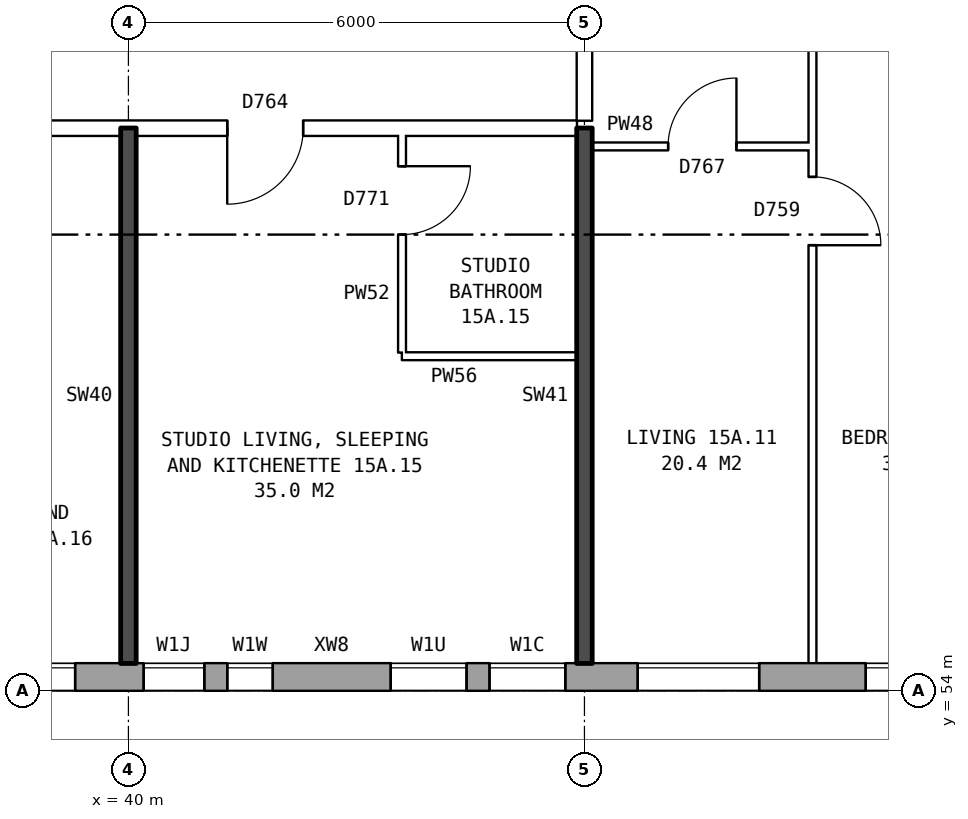
"""IFC4 building model, lengths in metres.
Left out: names, types, materials, properties, quantities, classifications, styles, units other than length and angle.
Written with IfcOpenShell. Run it as: python <this file> out.ifc"""

import sys

from ifc_helpers import new_model, si_unit, direction, frame, frame_2d, origin, place, context, subcontext, project, spatial, rectangle, extrude, element, fill, save


model = new_model("IFC4")
c1 = context("Model", 3, precision=1e-05, world=origin(), true_north=direction((0.0, 1.0)))
c2 = subcontext(c1, "Body", "Model", "MODEL_VIEW")
j1 = project(units=[si_unit("LENGTHUNIT", "METRE"), si_unit("PLANEANGLEUNIT", "RADIAN")], contexts=[c1])
p1 = place(None, origin())
s1 = spatial("IfcSite", under=j1, at=p1, CompositionType="ELEMENT")
p2 = place(p1, origin())
s2 = spatial("IfcBuilding", under=s1, at=p2, CompositionType="ELEMENT")
p3 = place(p2, frame((0.0, 0.0, 56.7)))
s3 = spatial("IfcBuildingStorey", under=s2, at=p3, CompositionType="ELEMENT", Elevation=56.7)
p4 = place(p3, frame((24.575, 54.18, 0.0), z_axis=(0.0, 0.0, 1.0), x_axis=(1.0, 0.0, 0.0)))
e1 = element("IfcWall", 1, at=p4, inside=s3, PredefinedType="STANDARD", context=c2, shape_type="SweptSolid", body=[
    extrude(rectangle(XDim=48.351, YDim=0.36, at=frame_2d((24.175, 0.0))), origin(), (0.0, 0.0, 1.0), 2.85),
])
p5 = place(p4, frame((1.125, 0.0, 0.8)))
e2 = element("IfcOpeningElement", 2, at=p5, cuts=e1, PredefinedType="OPENING", context=c2, shape_type="SweptSolid", body=[
    extrude(rectangle(XDim=1.6, YDim=1.8, at=frame_2d((0.8, 0.9))), frame((0.0, 0.19, 0.0), z_axis=(0.0, -1.0, 0.0), x_axis=(1.0, 0.0, 0.0)), (0.0, 0.0, 1.0), 0.38),
])
p6 = place(p4, frame((4.125, 0.0, 0.8)))
e3 = element("IfcOpeningElement", 3, at=p6, cuts=e1, PredefinedType="OPENING", context=c2, shape_type="SweptSolid", body=[
    extrude(rectangle(XDim=1.6, YDim=1.8, at=frame_2d((0.8, 0.9))), frame((0.0, 0.19, 0.0), z_axis=(0.0, -1.0, 0.0), x_axis=(1.0, 0.0, 0.0)), (0.0, 0.0, 1.0), 0.38),
])
p7 = place(p4, frame((7.125, 0.0, 0.8)))
e4 = element("IfcOpeningElement", 4, at=p7, cuts=e1, PredefinedType="OPENING", context=c2, shape_type="SweptSolid", body=[
    extrude(rectangle(XDim=1.6, YDim=1.8, at=frame_2d((0.8, 0.9))), frame((0.0, 0.19, 0.0), z_axis=(0.0, -1.0, 0.0), x_axis=(1.0, 0.0, 0.0)), (0.0, 0.0, 1.0), 0.38),
])
p8 = place(p4, frame((10.125, 0.0, 0.8)))
e5 = element("IfcOpeningElement", 5, at=p8, cuts=e1, PredefinedType="OPENING", context=c2, shape_type="SweptSolid", body=[
    extrude(rectangle(XDim=1.6, YDim=1.8, at=frame_2d((0.8, 0.9))), frame((0.0, 0.19, 0.0), z_axis=(0.0, -1.0, 0.0), x_axis=(1.0, 0.0, 0.0)), (0.0, 0.0, 1.0), 0.38),
])
p9 = place(p4, frame((13.125, 0.0, 0.8)))
e6 = element("IfcOpeningElement", 6, at=p9, cuts=e1, PredefinedType="OPENING", context=c2, shape_type="SweptSolid", body=[
    extrude(rectangle(XDim=1.6, YDim=1.8, at=frame_2d((0.8, 0.9))), frame((0.0, 0.19, 0.0), z_axis=(0.0, -1.0, 0.0), x_axis=(1.0, 0.0, 0.0)), (0.0, 0.0, 1.0), 0.38),
])
p10 = place(p4, frame((15.625, 0.0, 1.0)))
e7 = element("IfcOpeningElement", 7, at=p10, cuts=e1, PredefinedType="OPENING", context=c2, shape_type="SweptSolid", body=[
    extrude(rectangle(XDim=0.8, YDim=1.5, at=frame_2d((0.4, 0.75))), frame((0.0, 0.19, 0.0), z_axis=(0.0, -1.0, 0.0), x_axis=(1.0, 0.0, 0.0)), (0.0, 0.0, 1.0), 0.38),
])
p11 = place(p4, frame((16.725, 0.0, 1.6)))
e8 = element("IfcOpeningElement", 8, at=p11, cuts=e1, PredefinedType="OPENING", context=c2, shape_type="SweptSolid", body=[
    extrude(rectangle(XDim=0.6, YDim=0.9, at=frame_2d((0.3, 0.45))), frame((0.0, 0.19, 0.0), z_axis=(0.0, -1.0, 0.0), x_axis=(1.0, 0.0, 0.0)), (0.0, 0.0, 1.0), 0.38),
])
p12 = place(p4, frame((22.125, 0.0, 0.8)))
e9 = element("IfcOpeningElement", 9, at=p12, cuts=e1, PredefinedType="OPENING", context=c2, shape_type="SweptSolid", body=[
    extrude(rectangle(XDim=1.6, YDim=1.8, at=frame_2d((0.8, 0.9))), frame((0.0, 0.19, 0.0), z_axis=(0.0, -1.0, 0.0), x_axis=(1.0, 0.0, 0.0)), (0.0, 0.0, 1.0), 0.38),
])
p13 = place(p4, frame((25.125, 0.0, 0.8)))
e10 = element("IfcOpeningElement", 10, at=p13, cuts=e1, PredefinedType="OPENING", context=c2, shape_type="SweptSolid", body=[
    extrude(rectangle(XDim=1.6, YDim=1.8, at=frame_2d((0.8, 0.9))), frame((0.0, 0.19, 0.0), z_axis=(0.0, -1.0, 0.0), x_axis=(1.0, 0.0, 0.0)), (0.0, 0.0, 1.0), 0.38),
])
p14 = place(p4, frame((27.625, 0.0, 0.35)))
e11 = element("IfcOpeningElement", 11, at=p14, cuts=e1, PredefinedType="OPENING", context=c2, shape_type="SweptSolid", body=[
    extrude(rectangle(XDim=1.2, YDim=1.8, at=frame_2d((0.6, 0.9))), frame((0.0, 0.19, 0.0), z_axis=(0.0, -1.0, 0.0), x_axis=(1.0, 0.0, 0.0)), (0.0, 0.0, 1.0), 0.38),
])
p15 = place(p4, frame((30.875, 0.0, 1.7)))
e12 = element("IfcOpeningElement", 12, at=p15, cuts=e1, PredefinedType="OPENING", context=c2, shape_type="SweptSolid", body=[
    extrude(rectangle(XDim=1.0, YDim=0.9, at=frame_2d((0.5, 0.45))), frame((0.0, 0.19, 0.0), z_axis=(0.0, -1.0, 0.0), x_axis=(1.0, 0.0, 0.0)), (0.0, 0.0, 1.0), 0.38),
])
p16 = place(p4, frame((34.125, 0.0, 0.8)))
e13 = element("IfcOpeningElement", 13, at=p16, cuts=e1, PredefinedType="OPENING", context=c2, shape_type="SweptSolid", body=[
    extrude(rectangle(XDim=1.6, YDim=1.8, at=frame_2d((0.8, 0.9))), frame((0.0, 0.19, 0.0), z_axis=(0.0, -1.0, 0.0), x_axis=(1.0, 0.0, 0.0)), (0.0, 0.0, 1.0), 0.38),
])
p17 = place(p4, frame((37.125, 0.0, 0.8)))
e14 = element("IfcOpeningElement", 14, at=p17, cuts=e1, PredefinedType="OPENING", context=c2, shape_type="SweptSolid", body=[
    extrude(rectangle(XDim=1.6, YDim=1.8, at=frame_2d((0.8, 0.9))), frame((0.0, 0.19, 0.0), z_axis=(0.0, -1.0, 0.0), x_axis=(1.0, 0.0, 0.0)), (0.0, 0.0, 1.0), 0.38),
])
p18 = place(p4, frame((40.125, 0.0, 0.8)))
e15 = element("IfcOpeningElement", 15, at=p18, cuts=e1, PredefinedType="OPENING", context=c2, shape_type="SweptSolid", body=[
    extrude(rectangle(XDim=1.6, YDim=1.8, at=frame_2d((0.8, 0.9))), frame((0.0, 0.19, 0.0), z_axis=(0.0, -1.0, 0.0), x_axis=(1.0, 0.0, 0.0)), (0.0, 0.0, 1.0), 0.38),
])
p19 = place(p4, frame((43.125, 0.0, 0.8)))
e16 = element("IfcOpeningElement", 16, at=p19, cuts=e1, PredefinedType="OPENING", context=c2, shape_type="SweptSolid", body=[
    extrude(rectangle(XDim=1.6, YDim=1.8, at=frame_2d((0.8, 0.9))), frame((0.0, 0.19, 0.0), z_axis=(0.0, -1.0, 0.0), x_axis=(1.0, 0.0, 0.0)), (0.0, 0.0, 1.0), 0.38),
])
p20 = place(p4, frame((46.125, 0.0, 0.8)))
e17 = element("IfcOpeningElement", 17, at=p20, cuts=e1, PredefinedType="OPENING", context=c2, shape_type="SweptSolid", body=[
    extrude(rectangle(XDim=1.6, YDim=1.8, at=frame_2d((0.8, 0.9))), frame((0.0, 0.19, 0.0), z_axis=(0.0, -1.0, 0.0), x_axis=(1.0, 0.0, 0.0)), (0.0, 0.0, 1.0), 0.38),
])
p21 = place(p4, frame((18.875, 0.0, 0.8)))
e18 = element("IfcOpeningElement", 18, at=p21, cuts=e1, PredefinedType="OPENING", context=c2, shape_type="SweptSolid", body=[
    extrude(rectangle(XDim=1.0, YDim=0.9, at=frame_2d((0.5, 0.45))), frame((0.0, 0.19, 0.0), z_axis=(0.0, -1.0, 0.0), x_axis=(1.0, 0.0, 0.0)), (0.0, 0.0, 1.0), 0.38),
])
p22 = place(p4, frame((20.175, 0.0, 0.8)))
e19 = element("IfcOpeningElement", 19, at=p22, cuts=e1, PredefinedType="OPENING", context=c2, shape_type="SweptSolid", body=[
    extrude(rectangle(XDim=1.0, YDim=1.8, at=frame_2d((0.5, 0.9))), frame((0.0, 0.19, 0.0), z_axis=(0.0, -1.0, 0.0), x_axis=(1.0, 0.0, 0.0)), (0.0, 0.0, 1.0), 0.38),
])
p23 = place(p4, frame((29.125, 0.0, 0.35)))
e20 = element("IfcOpeningElement", 20, at=p23, cuts=e1, PredefinedType="OPENING", context=c2, shape_type="SweptSolid", body=[
    extrude(rectangle(XDim=1.0, YDim=0.9, at=frame_2d((0.5, 0.45))), frame((0.0, 0.19, 0.0), z_axis=(0.0, -1.0, 0.0), x_axis=(1.0, 0.0, 0.0)), (0.0, 0.0, 1.0), 0.38),
])
p24 = place(p4, frame((32.225, 0.0, 0.8)))
e21 = element("IfcOpeningElement", 21, at=p24, cuts=e1, PredefinedType="OPENING", context=c2, shape_type="SweptSolid", body=[
    extrude(rectangle(XDim=1.0, YDim=1.8, at=frame_2d((0.5, 0.9))), frame((0.0, 0.19, 0.0), z_axis=(0.0, -1.0, 0.0), x_axis=(1.0, 0.0, 0.0)), (0.0, 0.0, 1.0), 0.38),
])
p25 = place(p3, frame((43.6, 58.4, 0.0), z_axis=(0.0, 0.0, 1.0), x_axis=(1.0, 0.0, 0.0)))
e22 = element("IfcWall", 22, at=p25, inside=s3, PredefinedType="PARTITIONING", context=c2, shape_type="SweptSolid", body=[
    extrude(rectangle(XDim=2.3, YDim=0.1, at=frame_2d((1.15, 0.0))), origin(), (0.0, 0.0, 1.0), 2.85),
])
p26 = place(p3, frame((46.1, 61.16, 0.0), z_axis=(0.0, 0.0, 1.0), x_axis=(1.0, 0.0, 0.0)))
e23 = element("IfcWall", 23, at=p26, inside=s3, PredefinedType="PARTITIONING", context=c2, shape_type="SweptSolid", body=[
    extrude(rectangle(XDim=2.9, YDim=0.1, at=frame_2d((1.45, 0.0))), origin(), (0.0, 0.0, 1.0), 2.85),
])
p27 = place(p26, frame((1.0, 0.0, 0.0)))
e24 = element("IfcOpeningElement", 24, at=p27, cuts=e23, PredefinedType="OPENING", context=c2, shape_type="SweptSolid", body=[
    extrude(rectangle(XDim=0.9, YDim=2.1, at=frame_2d((0.45, 1.05))), frame((0.0, 0.06, 0.0), z_axis=(0.0, -1.0, 0.0), x_axis=(1.0, 0.0, 0.0)), (0.0, 0.0, 1.0), 0.12),
])
p28 = place(p3, frame((21.86, 61.4, 0.0), z_axis=(0.0, 0.0, 1.0), x_axis=(1.0, 0.0, 0.0)))
e25 = element("IfcWall", 25, at=p28, inside=s3, PredefinedType="PARTITIONING", context=c2, shape_type="SweptSolid", body=[
    extrude(rectangle(XDim=24.04, YDim=0.2, at=frame_2d((12.02, 0.0))), origin(), (0.0, 0.0, 1.0), 2.85),
])
p29 = place(p28, frame((19.44, 0.0, 0.0)))
e26 = element("IfcOpeningElement", 26, at=p29, cuts=e25, PredefinedType="OPENING", context=c2, shape_type="SweptSolid", body=[
    extrude(rectangle(XDim=1.0, YDim=2.1, at=frame_2d((0.5, 1.05))), frame((0.0, 0.11, 0.0), z_axis=(0.0, -1.0, 0.0), x_axis=(1.0, 0.0, 0.0)), (0.0, 0.0, 1.0), 0.22),
])
p30 = place(p28, frame((14.64, 0.0, 0.0)))
e27 = element("IfcOpeningElement", 27, at=p30, cuts=e25, PredefinedType="OPENING", context=c2, shape_type="SweptSolid", body=[
    extrude(rectangle(XDim=1.0, YDim=2.1, at=frame_2d((0.5, 1.05))), frame((0.0, 0.11, 0.0), z_axis=(0.0, -1.0, 0.0), x_axis=(1.0, 0.0, 0.0)), (0.0, 0.0, 1.0), 0.22),
])
p31 = place(p28, frame((2.57, 0.0, 0.0)))
e28 = element("IfcOpeningElement", 28, at=p31, cuts=e25, PredefinedType="OPENING", context=c2, shape_type="SweptSolid", body=[
    extrude(rectangle(XDim=1.0, YDim=2.1, at=frame_2d((0.5, 1.05))), frame((0.0, 0.11, 0.0), z_axis=(0.0, -1.0, 0.0), x_axis=(1.0, 0.0, 0.0)), (0.0, 0.0, 1.0), 0.22),
])
p32 = place(p3, frame((40.0, 54.36, 0.0), z_axis=(0.0, 0.0, 1.0), x_axis=(0.0, 1.0, 0.0)))
e29 = element("IfcWall", 29, at=p32, inside=s3, PredefinedType="SOLIDWALL", context=c2, shape_type="SweptSolid", body=[
    extrude(rectangle(XDim=7.04, YDim=0.2, at=frame_2d((3.52, 0.0))), origin(), (0.0, 0.0, 1.0), 2.85),
])
p33 = place(p3, frame((43.6, 58.45, 0.0), z_axis=(0.0, 0.0, 1.0), x_axis=(0.0, 1.0, 0.0)))
e30 = element("IfcWall", 30, at=p33, inside=s3, PredefinedType="PARTITIONING", context=c2, shape_type="SweptSolid", body=[
    extrude(rectangle(XDim=2.85, YDim=0.1, at=frame_2d((1.425, 0.0))), origin(), (0.0, 0.0, 1.0), 2.85),
])
p34 = place(p33, frame((1.55, 0.0, 0.0)))
e31 = element("IfcOpeningElement", 31, at=p34, cuts=e30, PredefinedType="OPENING", context=c2, shape_type="SweptSolid", body=[
    extrude(rectangle(XDim=0.9, YDim=2.1, at=frame_2d((0.45, 1.05))), frame((0.0, 0.06, 0.0), z_axis=(0.0, -1.0, 0.0), x_axis=(1.0, 0.0, 0.0)), (0.0, 0.0, 1.0), 0.12),
])
p35 = place(p3, frame((46.0, 54.36, 0.0), z_axis=(0.0, 0.0, 1.0), x_axis=(0.0, 1.0, 0.0)))
e32 = element("IfcWall", 32, at=p35, inside=s3, PredefinedType="SOLIDWALL", context=c2, shape_type="SweptSolid", body=[
    extrude(rectangle(XDim=7.04, YDim=0.2, at=frame_2d((3.52, 0.0))), origin(), (0.0, 0.0, 1.0), 2.85),
])
p36 = place(p3, frame((46.0, 61.5, 0.0), z_axis=(0.0, 0.0, 1.0), x_axis=(0.0, 1.0, 0.0)))
e33 = element("IfcWall", 33, at=p36, inside=s3, PredefinedType="PARTITIONING", context=c2, shape_type="SweptSolid", body=[
    extrude(rectangle(XDim=2.2, YDim=0.2, at=frame_2d((1.1, 0.0))), origin(), (0.0, 0.0, 1.0), 2.85),
])
p37 = place(p3, frame((49.0, 54.36, 0.0), z_axis=(0.0, 0.0, 1.0), x_axis=(0.0, 1.0, 0.0)))
e34 = element("IfcWall", 34, at=p37, inside=s3, PredefinedType="PARTITIONING", context=c2, shape_type="SweptSolid", body=[
    extrude(rectangle(XDim=14.34, YDim=0.1, at=frame_2d((7.17, 0.0))), origin(), (0.0, 0.0, 1.0), 2.85),
])
p38 = place(p37, frame((5.5, 0.0, 0.0)))
e35 = element("IfcOpeningElement", 35, at=p38, cuts=e34, PredefinedType="OPENING", context=c2, shape_type="SweptSolid", body=[
    extrude(rectangle(XDim=0.9, YDim=2.1, at=frame_2d((0.45, 1.05))), frame((0.0, 0.06, 0.0), z_axis=(0.0, -1.0, 0.0), x_axis=(1.0, 0.0, 0.0)), (0.0, 0.0, 1.0), 0.12),
])
p39 = place(p37, frame((13.04, 0.0, 0.0)))
e36 = element("IfcOpeningElement", 36, at=p39, cuts=e34, PredefinedType="OPENING", context=c2, shape_type="SweptSolid", body=[
    extrude(rectangle(XDim=0.9, YDim=2.1, at=frame_2d((0.45, 1.05))), frame((0.0, 0.06, 0.0), z_axis=(0.0, -1.0, 0.0), x_axis=(1.0, 0.0, 0.0)), (0.0, 0.0, 1.0), 0.12),
])
p40 = place(p9, origin())
e37 = element("IfcWindow", 37, at=p40, inside=s3, PartitioningType="SINGLE_PANEL", PredefinedType="WINDOW", context=c2, shape_type="SweptSolid", body=[
    extrude(rectangle(XDim=1.6, YDim=1.8, at=frame_2d((0.8, 0.9))), frame((0.0, 0.15, 0.0), z_axis=(0.0, -1.0, 0.0), x_axis=(1.0, 0.0, 0.0)), (0.0, 0.0, 1.0), 0.06),
])
fill(e6, e37)
p41 = place(p10, origin())
e38 = element("IfcWindow", 38, at=p41, inside=s3, PartitioningType="SINGLE_PANEL", PredefinedType="WINDOW", context=c2, shape_type="SweptSolid", body=[
    extrude(rectangle(XDim=0.8, YDim=1.5, at=frame_2d((0.4, 0.75))), frame((0.0, 0.15, 0.0), z_axis=(0.0, -1.0, 0.0), x_axis=(1.0, 0.0, 0.0)), (0.0, 0.0, 1.0), 0.06),
])
fill(e7, e38)
p42 = place(p11, origin())
e39 = element("IfcWindow", 39, at=p42, inside=s3, PartitioningType="SINGLE_PANEL", PredefinedType="WINDOW", context=c2, shape_type="SweptSolid", body=[
    extrude(rectangle(XDim=0.6, YDim=0.9, at=frame_2d((0.3, 0.45))), frame((0.0, 0.15, 0.0), z_axis=(0.0, -1.0, 0.0), x_axis=(1.0, 0.0, 0.0)), (0.0, 0.0, 1.0), 0.06),
])
fill(e8, e39)
p43 = place(p12, origin())
e40 = element("IfcWindow", 40, at=p43, inside=s3, PartitioningType="SINGLE_PANEL", PredefinedType="WINDOW", context=c2, shape_type="SweptSolid", body=[
    extrude(rectangle(XDim=1.6, YDim=1.8, at=frame_2d((0.8, 0.9))), frame((0.0, 0.15, 0.0), z_axis=(0.0, -1.0, 0.0), x_axis=(1.0, 0.0, 0.0)), (0.0, 0.0, 1.0), 0.06),
])
fill(e9, e40)
p44 = place(p13, origin())
e41 = element("IfcWindow", 41, at=p44, inside=s3, PartitioningType="SINGLE_PANEL", PredefinedType="WINDOW", context=c2, shape_type="SweptSolid", body=[
    extrude(rectangle(XDim=1.6, YDim=1.8, at=frame_2d((0.8, 0.9))), frame((0.0, 0.15, 0.0), z_axis=(0.0, -1.0, 0.0), x_axis=(1.0, 0.0, 0.0)), (0.0, 0.0, 1.0), 0.06),
])
fill(e10, e41)
p45 = place(p38, frame((0.9, 0.0, 0.0), z_axis=(0.0, 0.0, 1.0), x_axis=(-1.0, 0.0, 0.0)))
e42 = element("IfcDoor", 42, at=p45, inside=s3, OperationType="SINGLE_SWING_RIGHT", PredefinedType="DOOR", context=c2, shape_type="SweptSolid", body=[
    extrude(rectangle(XDim=0.9, YDim=2.1, at=frame_2d((0.45, 1.05))), frame((0.0, 0.025, 0.0), z_axis=(0.0, -1.0, 0.0), x_axis=(1.0, 0.0, 0.0)), (0.0, 0.0, 1.0), 0.05),
])
fill(e35, e42)
p46 = place(p27, origin())
e43 = element("IfcDoor", 43, at=p46, inside=s3, OperationType="SINGLE_SWING_RIGHT", PredefinedType="DOOR", context=c2, shape_type="SweptSolid", body=[
    extrude(rectangle(XDim=0.9, YDim=2.1, at=frame_2d((0.45, 1.05))), frame((0.0, 0.025, 0.0), z_axis=(0.0, -1.0, 0.0), x_axis=(1.0, 0.0, 0.0)), (0.0, 0.0, 1.0), 0.05),
])
fill(e24, e43)
p47 = place(p29, frame((1.0, 0.0, 0.0), z_axis=(0.0, 0.0, 1.0), x_axis=(-1.0, 0.0, 0.0)))
e44 = element("IfcDoor", 44, at=p47, inside=s3, OperationType="SINGLE_SWING_RIGHT", PredefinedType="DOOR", context=c2, shape_type="SweptSolid", body=[
    extrude(rectangle(XDim=1.0, YDim=2.1, at=frame_2d((0.5, 1.05))), frame((0.0, 0.025, 0.0), z_axis=(0.0, -1.0, 0.0), x_axis=(1.0, 0.0, 0.0)), (0.0, 0.0, 1.0), 0.05),
])
fill(e26, e44)
p48 = place(p34, frame((0.9, 0.0, 0.0), z_axis=(0.0, 0.0, 1.0), x_axis=(-1.0, 0.0, 0.0)))
e45 = element("IfcDoor", 45, at=p48, inside=s3, OperationType="SINGLE_SWING_LEFT", PredefinedType="DOOR", context=c2, shape_type="SweptSolid", body=[
    extrude(rectangle(XDim=0.9, YDim=2.1, at=frame_2d((0.45, 1.05))), frame((0.0, 0.025, 0.0), z_axis=(0.0, -1.0, 0.0), x_axis=(1.0, 0.0, 0.0)), (0.0, 0.0, 1.0), 0.05),
])
fill(e31, e45)
p49 = place(p21, origin())
e46 = element("IfcWindow", 46, at=p49, inside=s3, PartitioningType="SINGLE_PANEL", PredefinedType="WINDOW", context=c2, shape_type="SweptSolid", body=[
    extrude(rectangle(XDim=1.0, YDim=0.9, at=frame_2d((0.5, 0.45))), frame((0.0, 0.15, 0.0), z_axis=(0.0, -1.0, 0.0), x_axis=(1.0, 0.0, 0.0)), (0.0, 0.0, 1.0), 0.06),
])
fill(e18, e46)
p50 = place(p22, origin())
e47 = element("IfcWindow", 47, at=p50, inside=s3, PartitioningType="SINGLE_PANEL", PredefinedType="WINDOW", context=c2, shape_type="SweptSolid", body=[
    extrude(rectangle(XDim=1.0, YDim=1.8, at=frame_2d((0.5, 0.9))), frame((0.0, 0.15, 0.0), z_axis=(0.0, -1.0, 0.0), x_axis=(1.0, 0.0, 0.0)), (0.0, 0.0, 1.0), 0.06),
])
fill(e19, e47)
save(model, sys.argv[1])
